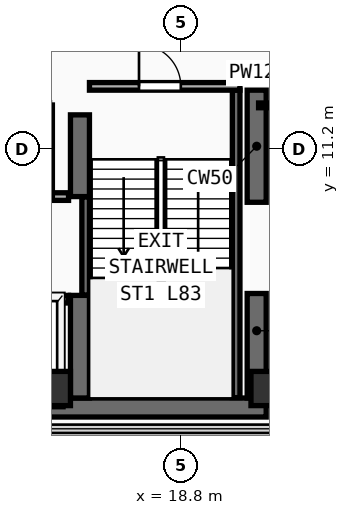
"""IFC4 building model, lengths in metres.
Left out: names, types, materials, properties, quantities, classifications, styles, units other than length and angle.
Written with IfcOpenShell. Run it as: python <this file> out.ifc"""

import sys

from ifc_helpers import new_model, si_unit, direction, frame, frame_2d, origin, origin_2d, place, context, subcontext, project, spatial, rectangle, extrude, element, fill, save


model = new_model("IFC4")
c1 = context("Model", 3, precision=1e-05, world=origin(), true_north=direction((0.0, 1.0)))
c2 = subcontext(c1, "Body", "Model", "MODEL_VIEW")
j1 = project(units=[si_unit("LENGTHUNIT", "METRE"), si_unit("PLANEANGLEUNIT", "RADIAN")], contexts=[c1])
p1 = place(None, origin())
s1 = spatial("IfcSite", under=j1, at=p1, CompositionType="ELEMENT")
p2 = place(p1, origin())
s2 = spatial("IfcBuilding", under=s1, at=p2, CompositionType="ELEMENT")
p3 = place(p2, frame((0.0, 0.0, 323.6)))
s3 = spatial("IfcBuildingStorey", under=s2, at=p3, CompositionType="ELEMENT", Elevation=323.6)
p4 = place(p3, frame((7.2, 4.4, 0.0), z_axis=(0.0, 0.0, 1.0), x_axis=(1.0, 0.0, 0.0)))
e1 = element("IfcWall", 1, at=p4, inside=s3, PredefinedType="SHEAR", context=c2, shape_type="SweptSolid", body=[
    extrude(rectangle(XDim=13.85, YDim=0.5, at=frame_2d((6.925, 0.0))), origin(), (0.0, 0.0, 1.0), 3.56),
])
p5 = place(p3, frame((20.8, 4.65, 0.0), z_axis=(0.0, 0.0, 1.0), x_axis=(0.0, 1.0, 0.0)))
e2 = element("IfcWall", 2, at=p5, inside=s3, PredefinedType="SHEAR", context=c2, shape_type="SweptSolid", body=[
    extrude(rectangle(XDim=2.75, YDim=0.5, at=frame_2d((1.375, 0.0))), origin(), (0.0, 0.0, 1.0), 3.56),
])
p6 = place(p3, frame((20.8, 9.8, 0.0), z_axis=(0.0, 0.0, 1.0), x_axis=(0.0, 1.0, 0.0)))
e3 = element("IfcWall", 3, at=p6, inside=s3, PredefinedType="SHEAR", context=c2, shape_type="SweptSolid", body=[
    extrude(rectangle(XDim=2.95, YDim=0.5, at=frame_2d((1.475, 0.0))), origin(), (0.0, 0.0, 1.0), 3.56),
])
p7 = place(p3, frame((16.15, 4.65, 0.0), z_axis=(0.0, 0.0, 1.0), x_axis=(0.0, 1.0, 0.0)))
e4 = element("IfcWall", 4, at=p7, inside=s3, PredefinedType="SHEAR", context=c2, shape_type="SweptSolid", body=[
    extrude(rectangle(XDim=2.7, YDim=0.5, at=frame_2d((1.35, 0.0))), origin(), (0.0, 0.0, 1.0), 3.56),
])
p8 = place(p3, frame((16.15, 9.95, 0.0), z_axis=(0.0, 0.0, 1.0), x_axis=(0.0, 1.0, 0.0)))
e5 = element("IfcWall", 5, at=p8, inside=s3, PredefinedType="SHEAR", context=c2, shape_type="SweptSolid", body=[
    extrude(rectangle(XDim=2.15, YDim=0.5, at=frame_2d((1.075, 0.0))), origin(), (0.0, 0.0, 1.0), 3.56),
])
for number, where, z_axis, x_axis in (
    (6, (15.45, 4.9, 0.0), (0.0, 0.0, 1.0), (1.0, 0.0, 0.0)),
    (7, (21.1, 4.9, 0.0), (0.0, 0.0, 1.0), (1.0, 0.0, 0.0)),
):
    element("IfcColumn", number, at=place(p3, frame(where, z_axis=z_axis, x_axis=x_axis)), inside=s3, PredefinedType="COLUMN", context=c2, shape_type="SweptSolid", body=[
        extrude(rectangle(XDim=0.9, YDim=0.9, at=origin_2d()), origin(), (0.0, 0.0, 1.0), 3.56),
    ])
p9 = place(p3, frame((16.3, 7.36, 0.0), z_axis=(0.0, 0.0, 1.0), x_axis=(0.0, 1.0, 0.0)))
e8 = element("IfcWall", 8, at=p9, inside=s3, PredefinedType="SHEAR", context=c2, shape_type="SweptSolid", body=[
    extrude(rectangle(XDim=2.58, YDim=0.2, at=frame_2d((1.29, 0.0))), origin(), (0.0, 0.0, 1.0), 3.56),
])
p10 = place(p3, frame((20.26, 4.66, 0.0), z_axis=(0.0, 0.0, 1.0), x_axis=(0.0, 1.0, 0.0)))
e9 = element("IfcWall", 9, at=p10, inside=s3, PredefinedType="SHEAR", context=c2, shape_type="SweptSolid", body=[
    extrude(rectangle(XDim=8.09, YDim=0.2, at=frame_2d((4.045, 0.0))), origin(), (0.0, 0.0, 1.0), 3.56),
])
p11 = place(p3, frame((16.4, 12.85, 0.0), z_axis=(0.0, 0.0, 1.0), x_axis=(1.0, 0.0, 0.0)))
e10 = element("IfcWall", 10, at=p11, inside=s3, PredefinedType="PARTITIONING", context=c2, shape_type="SweptSolid", body=[
    extrude(rectangle(XDim=3.96, YDim=0.2, at=frame_2d((1.98, 0.0))), origin(), (0.0, 0.0, 1.0), 3.56),
])
p12 = place(p11, frame((1.304, 0.0, 0.0)))
e11 = element("IfcOpeningElement", 11, at=p12, cuts=e10, PredefinedType="OPENING", context=c2, shape_type="SweptSolid", body=[
    extrude(rectangle(XDim=1.1, YDim=2.2, at=frame_2d((0.55, 1.1))), frame((0.0, 0.11, 0.0), z_axis=(0.0, -1.0, 0.0), x_axis=(1.0, 0.0, 0.0)), (0.0, 0.0, 1.0), 0.22),
])
p13 = place(p3, frame((7.5, 7.25, 0.0), z_axis=(0.0, 0.0, 1.0), x_axis=(1.0, 0.0, 0.0)))
e12 = element("IfcWall", 12, at=p13, inside=s3, PredefinedType="PARTITIONING", context=c2, shape_type="SweptSolid", body=[
    extrude(rectangle(XDim=8.35, YDim=0.2, at=frame_2d((4.175, 0.0))), origin(), (0.0, 0.0, 1.0), 3.56),
])
p14 = place(p13, frame((0.53, 0.0, 0.0)))
e13 = element("IfcOpeningElement", 13, at=p14, cuts=e12, PredefinedType="OPENING", context=c2, shape_type="SweptSolid", body=[
    extrude(rectangle(XDim=1.1, YDim=2.2, at=frame_2d((0.55, 1.1))), frame((0.0, 0.11, 0.0), z_axis=(0.0, -1.0, 0.0), x_axis=(1.0, 0.0, 0.0)), (0.0, 0.0, 1.0), 0.22),
])
p15 = place(p13, frame((2.37, 0.0, 0.0)))
e14 = element("IfcOpeningElement", 14, at=p15, cuts=e12, PredefinedType="OPENING", context=c2, shape_type="SweptSolid", body=[
    extrude(rectangle(XDim=1.1, YDim=2.2, at=frame_2d((0.55, 1.1))), frame((0.0, 0.11, 0.0), z_axis=(0.0, -1.0, 0.0), x_axis=(1.0, 0.0, 0.0)), (0.0, 0.0, 1.0), 0.22),
])
p16 = place(p13, frame((4.33, 0.0, 0.0)))
e15 = element("IfcOpeningElement", 15, at=p16, cuts=e12, PredefinedType="OPENING", context=c2, shape_type="SweptSolid", body=[
    extrude(rectangle(XDim=1.1, YDim=2.2, at=frame_2d((0.55, 1.1))), frame((0.0, 0.11, 0.0), z_axis=(0.0, -1.0, 0.0), x_axis=(1.0, 0.0, 0.0)), (0.0, 0.0, 1.0), 0.22),
])
p17 = place(p13, frame((6.5, 0.0, 0.0)))
e16 = element("IfcOpeningElement", 16, at=p17, cuts=e12, PredefinedType="OPENING", context=c2, shape_type="SweptSolid", body=[
    extrude(rectangle(XDim=1.1, YDim=2.2, at=frame_2d((0.55, 1.1))), frame((0.0, 0.11, 0.0), z_axis=(0.0, -1.0, 0.0), x_axis=(1.0, 0.0, 0.0)), (0.0, 0.0, 1.0), 0.22),
])
p18 = place(p3, frame((7.5, 9.95, 0.0), z_axis=(0.0, 0.0, 1.0), x_axis=(1.0, 0.0, 0.0)))
e17 = element("IfcWall", 17, at=p18, inside=s3, PredefinedType="PARTITIONING", context=c2, shape_type="SweptSolid", body=[
    extrude(rectangle(XDim=8.35, YDim=0.2, at=frame_2d((4.175, 0.0))), origin(), (0.0, 0.0, 1.0), 3.56),
])
p19 = place(p3, frame((15.35, 9.95, 0.0), z_axis=(0.0, 0.0, 1.0), x_axis=(0.0, 1.0, 0.0)))
e18 = element("IfcWall", 18, at=p19, inside=s3, PredefinedType="PARTITIONING", context=c2, shape_type="SweptSolid", body=[
    extrude(rectangle(XDim=2.41, YDim=0.15, at=frame_2d((1.205, 0.0))), origin(), (0.0, 0.0, 1.0), 3.56),
])
p20 = place(p3, frame((20.85, 12.35, 0.0), z_axis=(0.0, 0.0, 1.0), x_axis=(1.0, 0.0, 0.0)))
e19 = element("IfcWall", 19, at=p20, inside=s3, PredefinedType="PARTITIONING", context=c2, shape_type="SweptSolid", body=[
    extrude(rectangle(XDim=2.85, YDim=0.125, at=frame_2d((1.425, 0.0))), origin(), (0.0, 0.0, 1.0), 3.56),
])
p21 = place(p20, frame((0.971, 0.0, 0.0)))
e20 = element("IfcOpeningElement", 20, at=p21, cuts=e19, PredefinedType="OPENING", context=c2, shape_type="SweptSolid", body=[
    extrude(rectangle(XDim=0.95, YDim=2.15, at=frame_2d((0.475, 1.075))), frame((0.0, 0.073, 0.0), z_axis=(0.0, -1.0, 0.0), x_axis=(1.0, 0.0, 0.0)), (0.0, 0.0, 1.0), 0.145),
])
p22 = place(p12, frame((1.1, 0.0, 0.0), z_axis=(0.0, 0.0, 1.0), x_axis=(-1.0, 0.0, 0.0)))
e21 = element("IfcDoor", 21, at=p22, inside=s3, OperationType="SINGLE_SWING_RIGHT", PredefinedType="DOOR", context=c2, shape_type="SweptSolid", body=[
    extrude(rectangle(XDim=1.1, YDim=2.2, at=frame_2d((0.55, 1.1))), frame((0.0, 0.025, 0.0), z_axis=(0.0, -1.0, 0.0), x_axis=(1.0, 0.0, 0.0)), (0.0, 0.0, 1.0), 0.05),
])
fill(e11, e21)
save(model, sys.argv[1])
